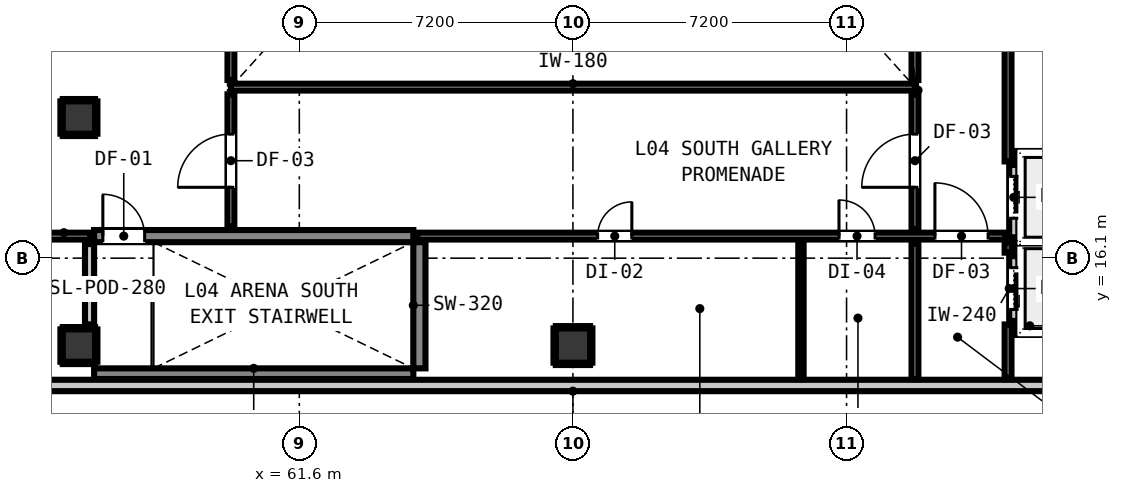
"""IFC4 building model, lengths in metres.
Left out: names, types, materials, properties, quantities, classifications, styles, units other than length and angle.
Written with IfcOpenShell. Run it as: python <this file> out.ifc"""

import sys

from ifc_helpers import new_model, si_unit, direction, frame, frame_2d, origin, origin_2d, place, context, subcontext, project, spatial, rectangle, circle, extrude, element, fill, save


model = new_model("IFC4")
c1 = context("Model", 3, precision=1e-05, world=origin(), true_north=direction((0.0, 1.0)))
c2 = subcontext(c1, "Body", "Model", "MODEL_VIEW")
j1 = project(units=[si_unit("LENGTHUNIT", "METRE"), si_unit("PLANEANGLEUNIT", "RADIAN")], contexts=[c1])
p1 = place(None, origin())
s1 = spatial("IfcSite", under=j1, at=p1, CompositionType="ELEMENT")
p2 = place(p1, origin())
s2 = spatial("IfcBuilding", under=s1, at=p2, CompositionType="ELEMENT")
p3 = place(p2, frame((0.0, 0.0, 17.8)))
s3 = spatial("IfcBuildingStorey", under=s2, at=p3, CompositionType="ELEMENT", Elevation=17.8)
p4 = place(p3, frame((64.76, 13.2, 0.0), z_axis=(0.0, 0.0, 1.0), x_axis=(0.0, 1.0, 0.0)))
e1 = element("IfcWall", 1, at=p4, inside=s3, PredefinedType="SHEAR", context=c2, shape_type="SweptSolid", body=[
    extrude(rectangle(XDim=3.32, YDim=0.32, at=frame_2d((1.66, 0.0))), origin(), (0.0, 0.0, 1.0), 4.2),
])
p5 = place(p3, frame((56.2, 13.06, 0.0), z_axis=(0.0, 0.0, 1.0), x_axis=(1.0, 0.0, 0.0)))
e2 = element("IfcWall", 2, at=p5, inside=s3, PredefinedType="SHEAR", context=c2, shape_type="SweptSolid", body=[
    extrude(rectangle(XDim=8.4, YDim=0.28, at=frame_2d((4.2, 0.0))), origin(), (0.0, 0.0, 1.0), 4.2),
])
p6 = place(p3, frame((56.2, 16.68, 0.0), z_axis=(0.0, 0.0, 1.0), x_axis=(1.0, 0.0, 0.0)))
e3 = element("IfcWall", 3, at=p6, inside=s3, PredefinedType="SHEAR", context=c2, shape_type="SweptSolid", body=[
    extrude(rectangle(XDim=8.4, YDim=0.32, at=frame_2d((4.2, 0.0))), origin(), (0.0, 0.0, 1.0), 4.2),
])
p7 = place(p6, frame((0.23, 0.0, 0.0)))
e4 = element("IfcOpeningElement", 4, at=p7, cuts=e3, PredefinedType="OPENING", context=c2, shape_type="SweptSolid", body=[
    extrude(rectangle(XDim=1.1, YDim=2.15, at=frame_2d((0.55, 1.075))), frame((0.0, 0.17, 0.0), z_axis=(0.0, -1.0, 0.0), x_axis=(1.0, 0.0, 0.0)), (0.0, 0.0, 1.0), 0.34),
])
for number, where, z_axis, x_axis in (
    (5, (55.8, 13.8, 0.0), (0.0, 0.0, 1.0), (1.0, 0.0, 0.0)),
    (6, (55.8, 19.8, 0.0), (0.0, 0.0, 1.0), (1.0, 0.0, 0.0)),
):
    element("IfcColumn", number, at=place(p3, frame(where, z_axis=z_axis, x_axis=x_axis)), inside=s3, PredefinedType="COLUMN", context=c2, shape_type="SweptSolid", body=[
        extrude(rectangle(XDim=0.85, YDim=0.85, at=origin_2d()), origin(), (0.0, 0.0, 1.0), 4.2),
    ])
p8 = place(p3, frame((68.8, 13.8, 0.0), z_axis=(0.0, 0.0, 1.0), x_axis=(1.0, 0.0, 0.0)))
e7 = element("IfcColumn", 7, at=p8, inside=s3, PredefinedType="COLUMN", context=c2, shape_type="SweptSolid", body=[
    extrude(circle(Radius=0.45, at=origin_2d()), origin(), (0.0, 0.0, 1.0), 4.2),
])
p9 = place(p3, frame((83.05, 12.75, 0.0), z_axis=(0.0, 0.0, 1.0), x_axis=(-1.0, 0.0, 0.0)))
e8 = element("IfcWall", 8, at=p9, inside=s3, PredefinedType="STANDARD", context=c2, shape_type="SweptSolid", body=[
    extrude(rectangle(XDim=28.5, YDim=0.3, at=frame_2d((14.25, 0.0))), origin(), (0.0, 0.0, 1.0), 4.2),
])
p10 = place(p3, frame((56.08, 14.357, 0.0), z_axis=(0.0, 0.0, 1.0), x_axis=(0.0, 1.0, 0.0)))
e9 = element("IfcWall", 9, at=p10, inside=s3, PredefinedType="PARTITIONING", context=c2, shape_type="SweptSolid", body=[
    extrude(rectangle(XDim=2.113, YDim=0.24, at=frame_2d((1.057, 0.0))), origin(), (0.0, 0.0, 1.0), 3.78),
])
p11 = place(p3, frame((80.4, 14.2, 0.0), z_axis=(0.0, 0.0, 1.0), x_axis=(1.0, 0.0, 0.0)))
e10 = element("IfcWall", 10, at=p11, inside=s3, PredefinedType="PARTITIONING", context=c2, shape_type="SweptSolid", body=[
    extrude(rectangle(XDim=0.843, YDim=0.24, at=frame_2d((0.421, 0.0))), origin(), (0.0, 0.0, 1.0), 3.78),
])
p12 = place(p3, frame((80.4, 16.4, 0.0), z_axis=(0.0, 0.0, 1.0), x_axis=(1.0, 0.0, 0.0)))
e11 = element("IfcWall", 11, at=p12, inside=s3, PredefinedType="PARTITIONING", context=c2, shape_type="SweptSolid", body=[
    extrude(rectangle(XDim=2.2, YDim=0.24, at=frame_2d((1.1, 0.0))), origin(), (0.0, 0.0, 1.0), 3.78),
])
p13 = place(p3, frame((80.4, 14.448, 0.0), z_axis=(0.0, 0.0, 1.0), x_axis=(0.0, 1.0, 0.0)))
e12 = element("IfcWall", 12, at=p13, inside=s3, PredefinedType="PARTITIONING", context=c2, shape_type="SweptSolid", body=[
    extrude(rectangle(XDim=1.704, YDim=0.24, at=frame_2d((0.852, 0.0))), origin(), (0.0, 0.0, 1.0), 3.78),
])
p14 = place(p13, frame((0.302, 0.0, 0.0)))
e13 = element("IfcOpeningElement", 13, at=p14, cuts=e12, PredefinedType="OPENING", context=c2, shape_type="SweptSolid", body=[
    extrude(rectangle(XDim=1.1, YDim=2.15, at=frame_2d((0.55, 1.075))), frame((0.0, 0.13, 0.0), z_axis=(0.0, -1.0, 0.0), x_axis=(1.0, 0.0, 0.0)), (0.0, 0.0, 1.0), 0.26),
])
p15 = place(p3, frame((80.4, 18.8, 0.0), z_axis=(0.0, 0.0, 1.0), x_axis=(1.0, 0.0, 0.0)))
e14 = element("IfcWall", 14, at=p15, inside=s3, PredefinedType="PARTITIONING", context=c2, shape_type="SweptSolid", body=[
    extrude(rectangle(XDim=2.2, YDim=0.24, at=frame_2d((1.1, 0.0))), origin(), (0.0, 0.0, 1.0), 3.78),
])
p16 = place(p3, frame((80.4, 16.648, 0.0), z_axis=(0.0, 0.0, 1.0), x_axis=(0.0, 1.0, 0.0)))
e15 = element("IfcWall", 15, at=p16, inside=s3, PredefinedType="PARTITIONING", context=c2, shape_type="SweptSolid", body=[
    extrude(rectangle(XDim=1.904, YDim=0.24, at=frame_2d((0.952, 0.0))), origin(), (0.0, 0.0, 1.0), 3.78),
])
p17 = place(p16, frame((0.502, 0.0, 0.0)))
e16 = element("IfcOpeningElement", 16, at=p17, cuts=e15, PredefinedType="OPENING", context=c2, shape_type="SweptSolid", body=[
    extrude(rectangle(XDim=1.1, YDim=2.15, at=frame_2d((0.55, 1.075))), frame((0.0, 0.13, 0.0), z_axis=(0.0, -1.0, 0.0), x_axis=(1.0, 0.0, 0.0)), (0.0, 0.0, 1.0), 0.26),
])
p18 = place(p3, frame((54.712, 16.68, 0.0), z_axis=(0.0, 0.0, 1.0), x_axis=(1.0, 0.0, 0.0)))
e17 = element("IfcWall", 17, at=p18, inside=s3, PredefinedType="PARTITIONING", context=c2, shape_type="SweptSolid", body=[
    extrude(rectangle(XDim=1.388, YDim=0.18, at=frame_2d((0.694, 0.0))), origin(), (0.0, 0.0, 1.0), 3.78),
])
p19 = place(p3, frame((64.7, 16.68, 0.0), z_axis=(0.0, 0.0, 1.0), x_axis=(1.0, 0.0, 0.0)))
e18 = element("IfcWall", 18, at=p19, inside=s3, PredefinedType="PARTITIONING", context=c2, shape_type="SweptSolid", body=[
    extrude(rectangle(XDim=15.482, YDim=0.18, at=frame_2d((7.741, 0.0))), origin(), (0.0, 0.0, 1.0), 3.78),
])
p20 = place(p19, frame((13.625, 0.0, 0.0)))
e19 = element("IfcOpeningElement", 19, at=p20, cuts=e18, PredefinedType="OPENING", context=c2, shape_type="SweptSolid", body=[
    extrude(rectangle(XDim=1.4, YDim=2.15, at=frame_2d((0.7, 1.075))), frame((0.0, 0.1, 0.0), z_axis=(0.0, -1.0, 0.0), x_axis=(1.0, 0.0, 0.0)), (0.0, 0.0, 1.0), 0.2),
])
p21 = place(p19, frame((4.75, 0.0, 0.0)))
e20 = element("IfcOpeningElement", 20, at=p21, cuts=e18, PredefinedType="OPENING", context=c2, shape_type="SweptSolid", body=[
    extrude(rectangle(XDim=0.9, YDim=2.1, at=frame_2d((0.45, 1.05))), frame((0.0, 0.1, 0.0), z_axis=(0.0, -1.0, 0.0), x_axis=(1.0, 0.0, 0.0)), (0.0, 0.0, 1.0), 0.2),
])
p22 = place(p19, frame((11.101, 0.0, 0.0)))
e21 = element("IfcOpeningElement", 21, at=p22, cuts=e18, PredefinedType="OPENING", context=c2, shape_type="SweptSolid", body=[
    extrude(rectangle(XDim=0.95, YDim=2.1, at=frame_2d((0.475, 1.05))), frame((0.0, 0.1, 0.0), z_axis=(0.0, -1.0, 0.0), x_axis=(1.0, 0.0, 0.0)), (0.0, 0.0, 1.0), 0.2),
])
p23 = place(p3, frame((59.8, 20.6, 0.0), z_axis=(0.0, 0.0, 1.0), x_axis=(1.0, 0.0, 0.0)))
e22 = element("IfcWall", 22, at=p23, inside=s3, PredefinedType="PARTITIONING", context=c2, shape_type="SweptSolid", body=[
    extrude(rectangle(XDim=18.0, YDim=0.18, at=frame_2d((9.0, 0.0))), origin(), (0.0, 0.0, 1.0), 3.78),
])
p24 = place(p3, frame((59.8, 16.94, 0.0), z_axis=(0.0, 0.0, 1.0), x_axis=(0.0, 1.0, 0.0)))
e23 = element("IfcWall", 23, at=p24, inside=s3, PredefinedType="PARTITIONING", context=c2, shape_type="SweptSolid", body=[
    extrude(rectangle(XDim=3.472, YDim=0.18, at=frame_2d((1.736, 0.0))), origin(), (0.0, 0.0, 1.0), 3.78),
])
p25 = place(p24, frame((1.024, 0.0, 0.0)))
e24 = element("IfcOpeningElement", 24, at=p25, cuts=e23, PredefinedType="OPENING", context=c2, shape_type="SweptSolid", body=[
    extrude(rectangle(XDim=1.4, YDim=2.15, at=frame_2d((0.7, 1.075))), frame((0.0, 0.1, 0.0), z_axis=(0.0, -1.0, 0.0), x_axis=(1.0, 0.0, 0.0)), (0.0, 0.0, 1.0), 0.2),
])
p26 = place(p3, frame((59.8, 20.788, 0.0), z_axis=(0.0, 0.0, 1.0), x_axis=(0.0, 1.0, 0.0)))
e25 = element("IfcWall", 25, at=p26, inside=s3, PredefinedType="PARTITIONING", context=c2, shape_type="SweptSolid", body=[
    extrude(rectangle(XDim=19.624, YDim=0.18, at=frame_2d((9.812, 0.0))), origin(), (0.0, 0.0, 1.0), 3.78),
])
p27 = place(p3, frame((77.8, 12.912, 0.0), z_axis=(0.0, 0.0, 1.0), x_axis=(0.0, 1.0, 0.0)))
e26 = element("IfcWall", 26, at=p27, inside=s3, PredefinedType="PARTITIONING", context=c2, shape_type="SweptSolid", body=[
    extrude(rectangle(XDim=3.58, YDim=0.18, at=frame_2d((1.79, 0.0))), origin(), (0.0, 0.0, 1.0), 3.78),
])
p28 = place(p3, frame((77.8, 16.868, 0.0), z_axis=(0.0, 0.0, 1.0), x_axis=(0.0, 1.0, 0.0)))
e27 = element("IfcWall", 27, at=p28, inside=s3, PredefinedType="PARTITIONING", context=c2, shape_type="SweptSolid", body=[
    extrude(rectangle(XDim=3.544, YDim=0.18, at=frame_2d((1.772, 0.0))), origin(), (0.0, 0.0, 1.0), 3.78),
])
p29 = place(p28, frame((1.096, 0.0, 0.0)))
e28 = element("IfcOpeningElement", 28, at=p29, cuts=e27, PredefinedType="OPENING", context=c2, shape_type="SweptSolid", body=[
    extrude(rectangle(XDim=1.4, YDim=2.15, at=frame_2d((0.7, 1.075))), frame((0.0, 0.1, 0.0), z_axis=(0.0, -1.0, 0.0), x_axis=(1.0, 0.0, 0.0)), (0.0, 0.0, 1.0), 0.2),
])
p30 = place(p3, frame((77.8, 20.788, 0.0), z_axis=(0.0, 0.0, 1.0), x_axis=(0.0, 1.0, 0.0)))
e29 = element("IfcWall", 29, at=p30, inside=s3, PredefinedType="PARTITIONING", context=c2, shape_type="SweptSolid", body=[
    extrude(rectangle(XDim=19.624, YDim=0.18, at=frame_2d((9.812, 0.0))), origin(), (0.0, 0.0, 1.0), 3.78),
])
p31 = place(p3, frame((80.25, 12.912, 0.0), z_axis=(0.0, 0.0, 1.0), x_axis=(0.0, 1.0, 0.0)))
e30 = element("IfcWall", 30, at=p31, inside=s3, PredefinedType="PARTITIONING", context=c2, shape_type="SweptSolid", body=[
    extrude(rectangle(XDim=1.443, YDim=0.18, at=frame_2d((0.721, 0.0))), origin(), (0.0, 0.0, 1.0), 3.78),
])
p32 = place(p3, frame((80.25, 16.245, 0.0), z_axis=(0.0, 0.0, 1.0), x_axis=(0.0, 1.0, 0.0)))
e31 = element("IfcWall", 31, at=p32, inside=s3, PredefinedType="PARTITIONING", context=c2, shape_type="SweptSolid", body=[
    extrude(rectangle(XDim=0.275, YDim=0.18, at=frame_2d((0.137, 0.0))), origin(), (0.0, 0.0, 1.0), 3.78),
])
p33 = place(p3, frame((80.25, 18.645, 0.0), z_axis=(0.0, 0.0, 1.0), x_axis=(0.0, 1.0, 0.0)))
e32 = element("IfcWall", 32, at=p33, inside=s3, PredefinedType="PARTITIONING", context=c2, shape_type="SweptSolid", body=[
    extrude(rectangle(XDim=25.677, YDim=0.18, at=frame_2d((12.838, 0.0))), origin(), (0.0, 0.0, 1.0), 3.78),
])
p34 = place(p3, frame((74.8, 12.912, 0.0), z_axis=(0.0, 0.0, 1.0), x_axis=(0.0, 1.0, 0.0)))
e33 = element("IfcWall", 33, at=p34, inside=s3, PredefinedType="PARTITIONING", context=c2, shape_type="SweptSolid", body=[
    extrude(rectangle(XDim=3.6, YDim=0.14, at=frame_2d((1.8, 0.0))), origin(), (0.0, 0.0, 1.0), 3.78),
])
for number, where, z_axis, x_axis in (
    (34, (55.375, 13.343, 0.0), (0.0, 0.0, 1.0), (1.0, 0.0, 0.0)),
    (35, (55.375, 14.257, 0.0), (0.0, 0.0, 1.0), (1.0, 0.0, 0.0)),
    (36, (55.343, 13.375, 0.0), (0.0, 0.0, 1.0), (0.0, 1.0, 0.0)),
    (37, (56.257, 13.375, 0.0), (0.0, 0.0, 1.0), (0.0, 1.0, 0.0)),
    (38, (55.375, 19.343, 0.0), (0.0, 0.0, 1.0), (1.0, 0.0, 0.0)),
    (39, (55.375, 20.257, 0.0), (0.0, 0.0, 1.0), (1.0, 0.0, 0.0)),
    (40, (55.343, 19.375, 0.0), (0.0, 0.0, 1.0), (0.0, 1.0, 0.0)),
    (41, (56.257, 19.375, 0.0), (0.0, 0.0, 1.0), (0.0, 1.0, 0.0)),
):
    element("IfcWall", number, at=place(p3, frame(where, z_axis=z_axis, x_axis=x_axis)), inside=s3, PredefinedType="PARTITIONING", context=c2, shape_type="SweptSolid", body=[
        extrude(rectangle(XDim=0.85, YDim=0.06, at=frame_2d((0.425, 0.0))), origin(), (0.0, 0.0, 1.0), 1.45),
    ])
for number, where, z_axis, x_axis in (
    (42, (68.35, 13.318, 0.0), (0.0, 0.0, 1.0), (1.0, 0.0, 0.0)),
    (43, (68.35, 14.282, 0.0), (0.0, 0.0, 1.0), (1.0, 0.0, 0.0)),
    (44, (68.318, 13.35, 0.0), (0.0, 0.0, 1.0), (0.0, 1.0, 0.0)),
    (45, (69.282, 13.35, 0.0), (0.0, 0.0, 1.0), (0.0, 1.0, 0.0)),
):
    element("IfcWall", number, at=place(p3, frame(where, z_axis=z_axis, x_axis=x_axis)), inside=s3, PredefinedType="PARTITIONING", context=c2, shape_type="SweptSolid", body=[
        extrude(rectangle(XDim=0.9, YDim=0.06, at=frame_2d((0.45, 0.0))), origin(), (0.0, 0.0, 1.0), 1.45),
    ])
p35 = place(p7, origin())
e46 = element("IfcDoor", 46, at=p35, inside=s3, OperationType="SINGLE_SWING_LEFT", PredefinedType="DOOR", context=c2, shape_type="SweptSolid", body=[
    extrude(rectangle(XDim=1.1, YDim=2.15, at=frame_2d((0.55, 1.075))), frame((0.0, 0.025, 0.0), z_axis=(0.0, -1.0, 0.0), x_axis=(1.0, 0.0, 0.0)), (0.0, 0.0, 1.0), 0.05),
])
fill(e4, e46)
p36 = place(p14, origin())
e47 = element("IfcDoor", 47, at=p36, inside=s3, OperationType="SLIDING_TO_LEFT", PredefinedType="DOOR", context=c2, shape_type="SweptSolid", body=[
    extrude(rectangle(XDim=1.1, YDim=2.15, at=frame_2d((0.55, 1.075))), frame((0.0, 0.025, 0.0), z_axis=(0.0, -1.0, 0.0), x_axis=(1.0, 0.0, 0.0)), (0.0, 0.0, 1.0), 0.05),
])
fill(e13, e47)
p37 = place(p17, origin())
e48 = element("IfcDoor", 48, at=p37, inside=s3, OperationType="SLIDING_TO_RIGHT", PredefinedType="DOOR", context=c2, shape_type="SweptSolid", body=[
    extrude(rectangle(XDim=1.1, YDim=2.15, at=frame_2d((0.55, 1.075))), frame((0.0, 0.025, 0.0), z_axis=(0.0, -1.0, 0.0), x_axis=(1.0, 0.0, 0.0)), (0.0, 0.0, 1.0), 0.05),
])
fill(e16, e48)
p38 = place(p25, origin())
e49 = element("IfcDoor", 49, at=p38, inside=s3, OperationType="SINGLE_SWING_LEFT", PredefinedType="DOOR", context=c2, shape_type="SweptSolid", body=[
    extrude(rectangle(XDim=1.4, YDim=2.15, at=frame_2d((0.7, 1.075))), frame((0.0, 0.025, 0.0), z_axis=(0.0, -1.0, 0.0), x_axis=(1.0, 0.0, 0.0)), (0.0, 0.0, 1.0), 0.05),
])
fill(e24, e49)
p39 = place(p29, origin())
e50 = element("IfcDoor", 50, at=p39, inside=s3, OperationType="SINGLE_SWING_LEFT", PredefinedType="DOOR", context=c2, shape_type="SweptSolid", body=[
    extrude(rectangle(XDim=1.4, YDim=2.15, at=frame_2d((0.7, 1.075))), frame((0.0, 0.025, 0.0), z_axis=(0.0, -1.0, 0.0), x_axis=(1.0, 0.0, 0.0)), (0.0, 0.0, 1.0), 0.05),
])
fill(e28, e50)
p40 = place(p20, origin())
e51 = element("IfcDoor", 51, at=p40, inside=s3, OperationType="SINGLE_SWING_LEFT", PredefinedType="DOOR", context=c2, shape_type="SweptSolid", body=[
    extrude(rectangle(XDim=1.4, YDim=2.15, at=frame_2d((0.7, 1.075))), frame((0.0, 0.025, 0.0), z_axis=(0.0, -1.0, 0.0), x_axis=(1.0, 0.0, 0.0)), (0.0, 0.0, 1.0), 0.05),
])
fill(e19, e51)
p41 = place(p21, origin())
e52 = element("IfcDoor", 52, at=p41, inside=s3, OperationType="SINGLE_SWING_RIGHT", PredefinedType="DOOR", context=c2, shape_type="SweptSolid", body=[
    extrude(rectangle(XDim=0.9, YDim=2.1, at=frame_2d((0.45, 1.05))), frame((0.0, 0.025, 0.0), z_axis=(0.0, -1.0, 0.0), x_axis=(1.0, 0.0, 0.0)), (0.0, 0.0, 1.0), 0.05),
])
fill(e20, e52)
p42 = place(p22, origin())
e53 = element("IfcDoor", 53, at=p42, inside=s3, OperationType="SINGLE_SWING_LEFT", PredefinedType="DOOR", context=c2, shape_type="SweptSolid", body=[
    extrude(rectangle(XDim=0.95, YDim=2.1, at=frame_2d((0.475, 1.05))), frame((0.0, 0.025, 0.0), z_axis=(0.0, -1.0, 0.0), x_axis=(1.0, 0.0, 0.0)), (0.0, 0.0, 1.0), 0.05),
])
fill(e21, e53)
save(model, sys.argv[1])
